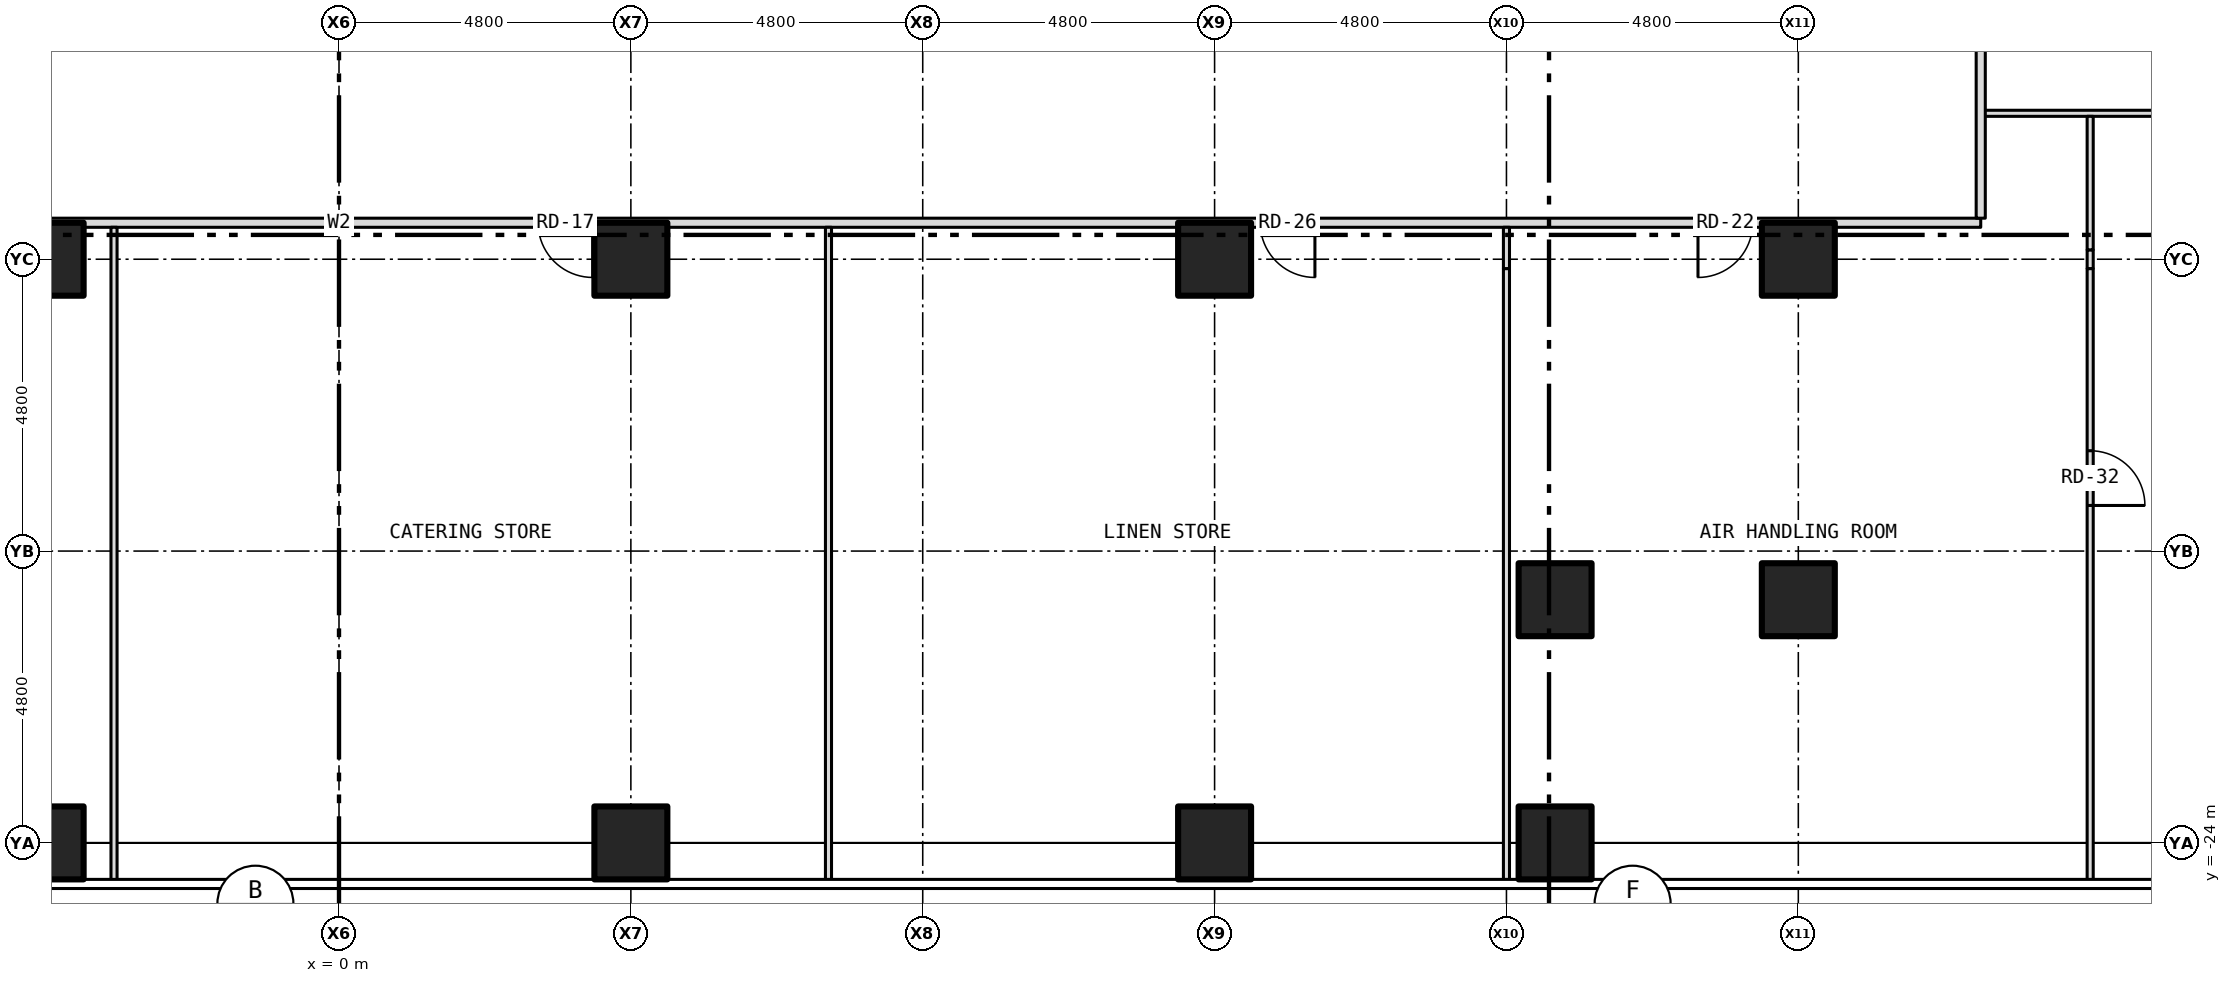
"""IFC4 building model, lengths in metres.
Left out: names, types, materials, properties, quantities, classifications, styles, units other than length and angle.
Written with IfcOpenShell. Run it as: python <this file> out.ifc"""

import sys

from ifc_helpers import new_model, si_unit, direction, frame, frame_2d, origin, origin_2d, place, context, subcontext, project, spatial, rectangle, hollow_rectangle, extrude, element, fill, save


model = new_model("IFC4")
c1 = context("Model", 3, precision=1e-05, world=origin(), true_north=direction((0.0, 1.0)))
c2 = subcontext(c1, "Body", "Model", "MODEL_VIEW")
j1 = project(units=[si_unit("LENGTHUNIT", "METRE"), si_unit("PLANEANGLEUNIT", "RADIAN")], contexts=[c1])
p1 = place(None, origin())
s1 = spatial("IfcSite", under=j1, at=p1, CompositionType="ELEMENT")
p2 = place(p1, origin())
s2 = spatial("IfcBuilding", under=s1, at=p2, CompositionType="ELEMENT")
p3 = place(p2, frame((0.0, 0.0, 7.5)))
s3 = spatial("IfcBuildingStorey", under=s2, at=p3, CompositionType="ELEMENT", Elevation=7.5)
for number, where, z_axis, x_axis in (
    (1, (-4.8, -24.0, -0.25), (0.0, 0.0, 1.0), (1.0, 0.0, 0.0)),
    (2, (4.8, -24.0, -0.25), (0.0, 0.0, 1.0), (1.0, 0.0, 0.0)),
    (3, (14.4, -24.0, -0.25), (0.0, 0.0, 1.0), (1.0, 0.0, 0.0)),
    (4, (20.0, -24.0, -0.25), (0.0, 0.0, 1.0), (1.0, 0.0, 0.0)),
    (5, (-4.8, -14.4, -0.25), (0.0, 0.0, 1.0), (1.0, 0.0, 0.0)),
    (6, (4.8, -14.4, -0.25), (0.0, 0.0, 1.0), (1.0, 0.0, 0.0)),
    (7, (14.4, -14.4, -0.25), (0.0, 0.0, 1.0), (1.0, 0.0, 0.0)),
    (8, (20.0, -20.0, -0.25), (0.0, 0.0, 1.0), (1.0, 0.0, 0.0)),
    (9, (24.0, -20.0, -0.25), (0.0, 0.0, 1.0), (1.0, 0.0, 0.0)),
    (10, (24.0, -14.4, -0.25), (0.0, 0.0, 1.0), (1.0, 0.0, 0.0)),
):
    element("IfcColumn", number, at=place(p3, frame(where, z_axis=z_axis, x_axis=x_axis)), inside=s3, PredefinedType="COLUMN", context=c2, shape_type="SweptSolid", body=[
        extrude(hollow_rectangle(XDim=1.2, YDim=1.2, WallThickness=0.07, at=origin_2d()), origin(), (0.0, 0.0, 1.0), 8.05),
    ])
p4 = place(p3, frame((-27.0, -13.8, 0.0), z_axis=(0.0, 0.0, 1.0), x_axis=(1.0, 0.0, 0.0)))
e11 = element("IfcWall", 11, at=p4, inside=s3, PredefinedType="PARTITIONING", context=c2, shape_type="SweptSolid", body=[
    extrude(rectangle(XDim=54.0, YDim=0.15, at=frame_2d((27.0, 0.0))), origin(), (0.0, 0.0, 1.0), 7.8),
])
p5 = place(p4, frame((9.03, 0.0, 0.0)))
e12 = element("IfcOpeningElement", 12, at=p5, cuts=e11, PredefinedType="OPENING", context=c2, shape_type="SweptSolid", body=[
    extrude(rectangle(XDim=0.9, YDim=2.1, at=frame_2d((0.45, 1.05))), frame((0.0, 0.087, 0.0), z_axis=(0.0, -1.0, 0.0), x_axis=(1.0, 0.0, 0.0)), (0.0, 0.0, 1.0), 0.174),
])
p6 = place(p4, frame((11.08, 0.0, 0.0)))
e13 = element("IfcOpeningElement", 13, at=p6, cuts=e11, PredefinedType="OPENING", context=c2, shape_type="SweptSolid", body=[
    extrude(rectangle(XDim=0.9, YDim=2.1, at=frame_2d((0.45, 1.05))), frame((0.0, 0.087, 0.0), z_axis=(0.0, -1.0, 0.0), x_axis=(1.0, 0.0, 0.0)), (0.0, 0.0, 1.0), 0.174),
])
p7 = place(p4, frame((19.891, 0.0, 0.0)))
e14 = element("IfcOpeningElement", 14, at=p7, cuts=e11, PredefinedType="OPENING", context=c2, shape_type="SweptSolid", body=[
    extrude(rectangle(XDim=0.9, YDim=2.1, at=frame_2d((0.45, 1.05))), frame((0.0, 0.087, 0.0), z_axis=(0.0, -1.0, 0.0), x_axis=(1.0, 0.0, 0.0)), (0.0, 0.0, 1.0), 0.174),
])
p8 = place(p4, frame((30.274, 0.0, 0.0)))
e15 = element("IfcOpeningElement", 15, at=p8, cuts=e11, PredefinedType="OPENING", context=c2, shape_type="SweptSolid", body=[
    extrude(rectangle(XDim=0.9, YDim=2.1, at=frame_2d((0.45, 1.05))), frame((0.0, 0.087, 0.0), z_axis=(0.0, -1.0, 0.0), x_axis=(1.0, 0.0, 0.0)), (0.0, 0.0, 1.0), 0.174),
])
p9 = place(p4, frame((3.75, 0.0, 0.0)))
e16 = element("IfcOpeningElement", 16, at=p9, cuts=e11, PredefinedType="OPENING", context=c2, shape_type="SweptSolid", body=[
    extrude(rectangle(XDim=0.9, YDim=2.1, at=frame_2d((0.45, 1.05))), frame((0.0, 0.087, 0.0), z_axis=(0.0, -1.0, 0.0), x_axis=(1.0, 0.0, 0.0)), (0.0, 0.0, 1.0), 0.174),
])
p10 = place(p4, frame((49.35, 0.0, 0.0)))
e17 = element("IfcOpeningElement", 17, at=p10, cuts=e11, PredefinedType="OPENING", context=c2, shape_type="SweptSolid", body=[
    extrude(rectangle(XDim=0.9, YDim=2.1, at=frame_2d((0.45, 1.05))), frame((0.0, 0.087, 0.0), z_axis=(0.0, -1.0, 0.0), x_axis=(1.0, 0.0, 0.0)), (0.0, 0.0, 1.0), 0.174),
])
p11 = place(p4, frame((42.15, 0.0, 0.0)))
e18 = element("IfcOpeningElement", 18, at=p11, cuts=e11, PredefinedType="OPENING", context=c2, shape_type="SweptSolid", body=[
    extrude(rectangle(XDim=0.9, YDim=2.1, at=frame_2d((0.45, 1.05))), frame((0.0, 0.087, 0.0), z_axis=(0.0, -1.0, 0.0), x_axis=(1.0, 0.0, 0.0)), (0.0, 0.0, 1.0), 0.174),
])
p12 = place(p4, frame((15.239, 0.0, 0.0)))
e19 = element("IfcOpeningElement", 19, at=p12, cuts=e11, PredefinedType="OPENING", context=c2, shape_type="SweptSolid", body=[
    extrude(rectangle(XDim=0.9, YDim=2.1, at=frame_2d((0.45, 1.05))), frame((0.0, 0.087, 0.0), z_axis=(0.0, -1.0, 0.0), x_axis=(1.0, 0.0, 0.0)), (0.0, 0.0, 1.0), 0.174),
])
p13 = place(p3, frame((27.0, -12.0, 0.0), z_axis=(0.0, 0.0, 1.0), x_axis=(1.0, 0.0, 0.0)))
e20 = element("IfcWall", 20, at=p13, inside=s3, PredefinedType="PARTITIONING", context=c2, shape_type="SweptSolid", body=[
    extrude(rectangle(XDim=11.28, YDim=0.1, at=frame_2d((5.64, 0.0))), origin(), (0.0, 0.0, 1.0), 7.8),
])
for number, where, z_axis, x_axis in (
    (21, (-3.7, -24.63, 0.0), (0.0, 0.0, 1.0), (0.0, 1.0, 0.0)),
    (22, (8.05, -24.63, 0.0), (0.0, 0.0, 1.0), (0.0, 1.0, 0.0)),
):
    element("IfcWall", number, at=place(p3, frame(where, z_axis=z_axis, x_axis=x_axis)), inside=s3, PredefinedType="PARTITIONING", context=c2, shape_type="SweptSolid", body=[
        extrude(rectangle(XDim=10.755, YDim=0.1, at=frame_2d((5.377, 0.0))), origin(), (0.0, 0.0, 1.0), 7.8),
    ])
p14 = place(p3, frame((19.2, -24.63, 0.0), z_axis=(0.0, 0.0, 1.0), x_axis=(0.0, 1.0, 0.0)))
e23 = element("IfcWall", 23, at=p14, inside=s3, PredefinedType="PARTITIONING", context=c2, shape_type="SweptSolid", body=[
    extrude(rectangle(XDim=10.076, YDim=0.1, at=frame_2d((5.038, 0.0))), origin(), (0.0, 0.0, 1.0), 7.183),
])
p15 = place(p3, frame((19.2, -14.554, 0.0), z_axis=(0.0, 0.0, 1.0), x_axis=(0.0, 1.0, 0.0)))
e24 = element("IfcWall", 24, at=p15, inside=s3, PredefinedType="PARTITIONING", context=c2, shape_type="SweptSolid", body=[
    extrude(rectangle(XDim=0.679, YDim=0.1, at=frame_2d((0.339, 0.0))), origin(), (0.0, 0.0, 1.0), 7.8),
])
p16 = place(p3, frame((27.0, -13.725, 0.0), z_axis=(0.0, 0.0, 1.0), x_axis=(0.0, 1.0, 0.0)))
e25 = element("IfcWall", 25, at=p16, inside=s3, PredefinedType="PARTITIONING", context=c2, shape_type="SweptSolid", body=[
    extrude(rectangle(XDim=27.45, YDim=0.15, at=frame_2d((13.725, 0.0))), origin(), (0.0, 0.0, 1.0), 7.8),
])
p17 = place(p16, frame((7.275, 0.0, 0.0)))
e26 = element("IfcOpeningElement", 26, at=p17, cuts=e25, PredefinedType="OPENING", context=c2, shape_type="SweptSolid", body=[
    extrude(rectangle(XDim=0.9, YDim=2.1, at=frame_2d((0.45, 1.05))), frame((0.0, 0.087, 0.0), z_axis=(0.0, -1.0, 0.0), x_axis=(1.0, 0.0, 0.0)), (0.0, 0.0, 1.0), 0.174),
])
p18 = place(p16, frame((19.275, 0.0, 0.0)))
e27 = element("IfcOpeningElement", 27, at=p18, cuts=e25, PredefinedType="OPENING", context=c2, shape_type="SweptSolid", body=[
    extrude(rectangle(XDim=0.9, YDim=2.1, at=frame_2d((0.45, 1.05))), frame((0.0, 0.087, 0.0), z_axis=(0.0, -1.0, 0.0), x_axis=(1.0, 0.0, 0.0)), (0.0, 0.0, 1.0), 0.174),
])
p19 = place(p3, frame((28.8, -24.63, 0.0), z_axis=(0.0, 0.0, 1.0), x_axis=(0.0, 1.0, 0.0)))
e28 = element("IfcWall", 28, at=p19, inside=s3, PredefinedType="PARTITIONING", context=c2, shape_type="SweptSolid", body=[
    extrude(rectangle(XDim=10.076, YDim=0.1, at=frame_2d((5.038, 0.0))), origin(), (0.0, 0.0, 1.0), 7.183),
])
p20 = place(p19, frame((6.18, 0.0, 0.0)))
e29 = element("IfcOpeningElement", 29, at=p20, cuts=e28, PredefinedType="OPENING", context=c2, shape_type="SweptSolid", body=[
    extrude(rectangle(XDim=0.9, YDim=2.1, at=frame_2d((0.45, 1.05))), frame((0.0, 0.062, 0.0), z_axis=(0.0, -1.0, 0.0), x_axis=(1.0, 0.0, 0.0)), (0.0, 0.0, 1.0), 0.124),
])
p21 = place(p3, frame((28.8, -14.554, 0.0), z_axis=(0.0, 0.0, 1.0), x_axis=(0.0, 1.0, 0.0)))
e30 = element("IfcWall", 30, at=p21, inside=s3, PredefinedType="PARTITIONING", context=c2, shape_type="SweptSolid", body=[
    extrude(rectangle(XDim=0.308, YDim=0.1, at=frame_2d((0.154, 0.0))), origin(), (0.0, 0.0, 1.0), 7.8),
])
p22 = place(p3, frame((28.8, -14.246, 0.0), z_axis=(0.0, 0.0, 1.0), x_axis=(0.0, 1.0, 0.0)))
e31 = element("IfcWall", 31, at=p22, inside=s3, PredefinedType="PARTITIONING", context=c2, shape_type="SweptSolid", body=[
    extrude(rectangle(XDim=2.196, YDim=0.1, at=frame_2d((1.098, 0.0))), origin(), (0.0, 0.0, 1.0), 7.183),
])
p23 = place(p8, origin())
e32 = element("IfcDoor", 32, at=p23, inside=s3, OperationType="SINGLE_SWING_RIGHT", PredefinedType="DOOR", context=c2, shape_type="SweptSolid", body=[
    extrude(rectangle(XDim=0.9, YDim=2.1, at=frame_2d((0.45, 1.05))), frame((0.0, 0.025, 0.0), z_axis=(0.0, -1.0, 0.0), x_axis=(1.0, 0.0, 0.0)), (0.0, 0.0, 1.0), 0.05),
])
fill(e15, e32)
p24 = place(p10, origin())
e33 = element("IfcDoor", 33, at=p24, inside=s3, OperationType="SINGLE_SWING_LEFT", PredefinedType="DOOR", context=c2, shape_type="SweptSolid", body=[
    extrude(rectangle(XDim=0.9, YDim=2.1, at=frame_2d((0.45, 1.05))), frame((0.0, 0.025, 0.0), z_axis=(0.0, -1.0, 0.0), x_axis=(1.0, 0.0, 0.0)), (0.0, 0.0, 1.0), 0.05),
])
fill(e17, e33)
p25 = place(p11, origin())
e34 = element("IfcDoor", 34, at=p25, inside=s3, OperationType="SINGLE_SWING_RIGHT", PredefinedType="DOOR", context=c2, shape_type="SweptSolid", body=[
    extrude(rectangle(XDim=0.9, YDim=2.1, at=frame_2d((0.45, 1.05))), frame((0.0, 0.025, 0.0), z_axis=(0.0, -1.0, 0.0), x_axis=(1.0, 0.0, 0.0)), (0.0, 0.0, 1.0), 0.05),
])
fill(e18, e34)
p26 = place(p20, origin())
e35 = element("IfcDoor", 35, at=p26, inside=s3, OperationType="SINGLE_SWING_LEFT", PredefinedType="DOOR", context=c2, shape_type="SweptSolid", body=[
    extrude(rectangle(XDim=0.9, YDim=2.1, at=frame_2d((0.45, 1.05))), frame((0.0, 0.025, 0.0), z_axis=(0.0, -1.0, 0.0), x_axis=(1.0, 0.0, 0.0)), (0.0, 0.0, 1.0), 0.05),
])
fill(e29, e35)
save(model, sys.argv[1])
